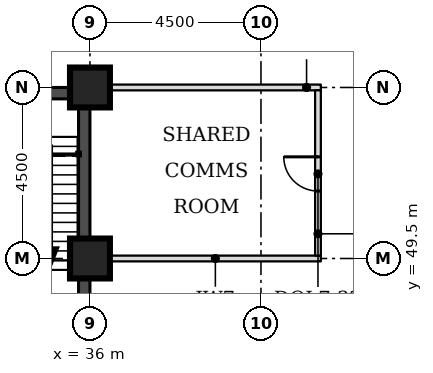
"""IFC4 building model, lengths in metres.
Left out: names, types, materials, properties, quantities, classifications, styles, units other than length and angle.
Written with IfcOpenShell. Run it as: python <this file> out.ifc"""

import sys

from ifc_helpers import new_model, si_unit, direction, frame, frame_2d, origin, origin_2d, place, context, subcontext, project, spatial, rectangle, extrude, element, fill, save


model = new_model("IFC4")
c1 = context("Model", 3, precision=1e-05, world=origin(), true_north=direction((0.0, 1.0)))
c2 = subcontext(c1, "Body", "Model", "MODEL_VIEW")
j1 = project(units=[si_unit("LENGTHUNIT", "METRE"), si_unit("PLANEANGLEUNIT", "RADIAN")], contexts=[c1])
p1 = place(None, origin())
s1 = spatial("IfcSite", under=j1, at=p1, CompositionType="ELEMENT")
p2 = place(p1, origin())
s2 = spatial("IfcBuilding", under=s1, at=p2, CompositionType="ELEMENT")
p3 = place(p2, frame((0.0, 0.0, 127.0)))
s3 = spatial("IfcBuildingStorey", under=s2, at=p3, CompositionType="ELEMENT", Elevation=127.0)
for number, where, z_axis, x_axis in (
    (1, (36.0, 49.5, 0.0), (0.0, 0.0, 1.0), (1.0, 0.0, 0.0)),
    (2, (36.0, 54.0, 0.0), (0.0, 0.0, 1.0), (1.0, 0.0, 0.0)),
):
    element("IfcColumn", number, at=place(p3, frame(where, z_axis=z_axis, x_axis=x_axis)), inside=s3, PredefinedType="COLUMN", context=c2, shape_type="SweptSolid", body=[
        extrude(rectangle(XDim=1.05, YDim=1.05, at=origin_2d()), origin(), (0.0, 0.0, 1.0), 3.7),
    ])
p4 = place(p3, frame((27.3, 53.85, 0.0), z_axis=(0.0, 0.0, 1.0), x_axis=(1.0, 0.0, 0.0)))
e3 = element("IfcWall", 3, at=p4, inside=s3, PredefinedType="SHEAR", context=c2, shape_type="SweptSolid", body=[
    extrude(rectangle(XDim=8.4, YDim=0.3, at=frame_2d((4.2, 0.0))), origin(), (0.0, 0.0, 1.0), 3.7),
])
p5 = place(p4, frame((6.4, 0.0, 0.0)))
e4 = element("IfcOpeningElement", 4, at=p5, cuts=e3, PredefinedType="OPENING", context=c2, shape_type="SweptSolid", body=[
    extrude(rectangle(XDim=1.1, YDim=2.1, at=frame_2d((0.55, 1.05))), frame((0.0, 0.16, 0.0), z_axis=(0.0, -1.0, 0.0), x_axis=(1.0, 0.0, 0.0)), (0.0, 0.0, 1.0), 0.32),
])
p6 = place(p3, frame((35.85, 45.0, 0.0), z_axis=(0.0, 0.0, 1.0), x_axis=(0.0, 1.0, 0.0)))
e5 = element("IfcWall", 5, at=p6, inside=s3, PredefinedType="SHEAR", context=c2, shape_type="SweptSolid", body=[
    extrude(rectangle(XDim=9.0, YDim=0.3, at=frame_2d((4.5, 0.0))), origin(), (0.0, 0.0, 1.0), 3.7),
])
for number, where, z_axis, x_axis in (
    (6, (36.525, 49.5, 0.0), (0.0, 0.0, 1.0), (1.0, 0.0, 0.0)),
    (7, (36.525, 54.0, 0.0), (0.0, 0.0, 1.0), (1.0, 0.0, 0.0)),
):
    element("IfcWall", number, at=place(p3, frame(where, z_axis=z_axis, x_axis=x_axis)), inside=s3, PredefinedType="PARTITIONING", context=c2, shape_type="SweptSolid", body=[
        extrude(rectangle(XDim=5.55, YDim=0.15, at=frame_2d((2.775, 0.0))), origin(), (0.0, 0.0, 1.0), 3.55),
    ])
p7 = place(p3, frame((42.0, 49.575, 0.0), z_axis=(0.0, 0.0, 1.0), x_axis=(0.0, 1.0, 0.0)))
e8 = element("IfcWall", 8, at=p7, inside=s3, PredefinedType="PARTITIONING", context=c2, shape_type="SweptSolid", body=[
    extrude(rectangle(XDim=4.35, YDim=0.15, at=frame_2d((2.175, 0.0))), origin(), (0.0, 0.0, 1.0), 3.55),
])
p8 = place(p7, frame((1.7, 0.0, 0.0)))
e9 = element("IfcOpeningElement", 9, at=p8, cuts=e8, PredefinedType="OPENING", context=c2, shape_type="SweptSolid", body=[
    extrude(rectangle(XDim=0.9, YDim=2.1, at=frame_2d((0.45, 1.05))), frame((0.0, 0.085, 0.0), z_axis=(0.0, -1.0, 0.0), x_axis=(1.0, 0.0, 0.0)), (0.0, 0.0, 1.0), 0.17),
])
p9 = place(p8, origin())
e10 = element("IfcDoor", 10, at=p9, inside=s3, OperationType="SINGLE_SWING_RIGHT", PredefinedType="DOOR", context=c2, shape_type="SweptSolid", body=[
    extrude(rectangle(XDim=0.9, YDim=2.1, at=frame_2d((0.45, 1.05))), frame((0.0, 0.025, 0.0), z_axis=(0.0, -1.0, 0.0), x_axis=(1.0, 0.0, 0.0)), (0.0, 0.0, 1.0), 0.05),
])
fill(e9, e10)
save(model, sys.argv[1])
